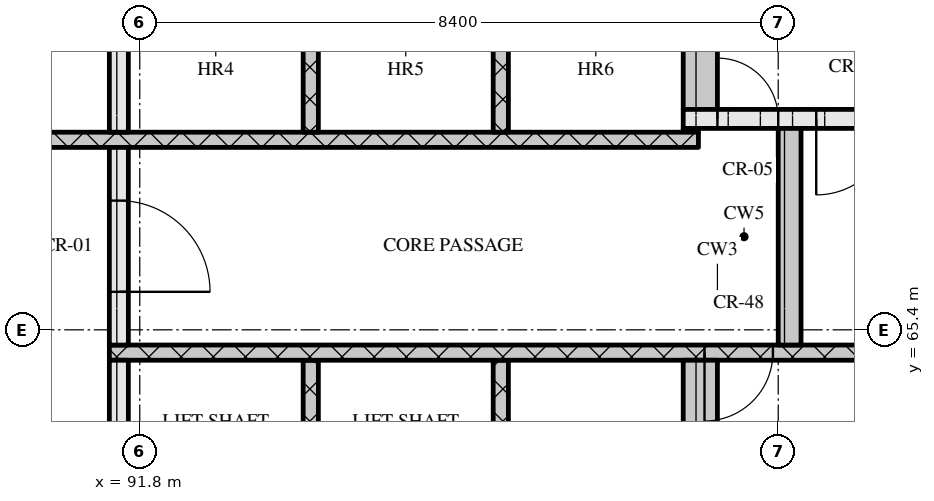
"""IFC4 building model, lengths in metres.
Left out: names, types, materials, properties, quantities, classifications, styles, units other than length and angle.
Written with IfcOpenShell. Run it as: python <this file> out.ifc"""

import sys

from ifc_helpers import new_model, si_unit, direction, frame, frame_2d, origin, place, context, subcontext, project, spatial, rectangle, extrude, element, fill, save


model = new_model("IFC4")
c1 = context("Model", 3, precision=1e-05, world=origin(), true_north=direction((0.0, 1.0)))
c2 = subcontext(c1, "Body", "Model", "MODEL_VIEW")
j1 = project(units=[si_unit("LENGTHUNIT", "METRE"), si_unit("PLANEANGLEUNIT", "RADIAN")], contexts=[c1])
p1 = place(None, origin())
s1 = spatial("IfcSite", under=j1, at=p1, CompositionType="ELEMENT")
p2 = place(p1, origin())
s2 = spatial("IfcBuilding", under=s1, at=p2, CompositionType="ELEMENT")
p3 = place(p2, frame((0.0, 0.0, 95.25)))
s3 = spatial("IfcBuildingStorey", under=s2, at=p3, CompositionType="ELEMENT", Elevation=95.25)
p4 = place(p3, frame((91.525, 62.4, 0.0), z_axis=(0.0, 0.0, 1.0), x_axis=(0.0, 1.0, 0.0)))
e1 = element("IfcWall", 1, at=p4, inside=s3, PredefinedType="SOLIDWALL", context=c2, shape_type="SweptSolid", body=[
    extrude(rectangle(XDim=2.6, YDim=0.25, at=frame_2d((1.3, 0.0))), origin(), (0.0, 0.0, 1.0), 3.32),
])
for number, where, z_axis, x_axis in (
    (2, (94.05, 62.4, 0.0), (0.0, 0.0, 1.0), (0.0, 1.0, 0.0)),
    (3, (96.55, 62.4, 0.0), (0.0, 0.0, 1.0), (0.0, 1.0, 0.0)),
):
    element("IfcWall", number, at=place(p3, frame(where, z_axis=z_axis, x_axis=x_axis)), inside=s3, PredefinedType="SOLIDWALL", context=c2, shape_type="SweptSolid", body=[
        extrude(rectangle(XDim=2.6, YDim=0.2, at=frame_2d((1.3, 0.0))), origin(), (0.0, 0.0, 1.0), 3.32),
    ])
p5 = place(p3, frame((99.175, 62.4, 0.0), z_axis=(0.0, 0.0, 1.0), x_axis=(0.0, 1.0, 0.0)))
e4 = element("IfcWall", 4, at=p5, inside=s3, PredefinedType="SOLIDWALL", context=c2, shape_type="SweptSolid", body=[
    extrude(rectangle(XDim=2.6, YDim=0.45, at=frame_2d((1.3, 0.0))), origin(), (0.0, 0.0, 1.0), 3.32),
])
p6 = place(p3, frame((91.4, 65.1, 0.0), z_axis=(0.0, 0.0, 1.0), x_axis=(1.0, 0.0, 0.0)))
e5 = element("IfcWall", 5, at=p6, inside=s3, PredefinedType="SOLIDWALL", context=c2, shape_type="SweptSolid", body=[
    extrude(rectangle(XDim=16.0, YDim=0.2, at=frame_2d((8.0, 0.0))), origin(), (0.0, 0.0, 1.0), 3.32),
])
p7 = place(p6, frame((7.83, 0.0, 0.0)))
e6 = element("IfcOpeningElement", 6, at=p7, cuts=e5, PredefinedType="OPENING", context=c2, shape_type="SweptSolid", body=[
    extrude(rectangle(XDim=0.9, YDim=2.1, at=frame_2d((0.45, 1.05))), frame((0.0, 0.11, 0.0), z_axis=(0.0, -1.0, 0.0), x_axis=(1.0, 0.0, 0.0)), (0.0, 0.0, 1.0), 0.22),
])
p8 = place(p3, frame((91.525, 65.2, 0.0), z_axis=(0.0, 0.0, 1.0), x_axis=(0.0, 1.0, 0.0)))
e7 = element("IfcWall", 7, at=p8, inside=s3, PredefinedType="SOLIDWALL", context=c2, shape_type="SweptSolid", body=[
    extrude(rectangle(XDim=2.6, YDim=0.25, at=frame_2d((1.3, 0.0))), origin(), (0.0, 0.0, 1.0), 3.32),
])
p9 = place(p8, frame((0.7, 0.0, 0.0)))
e8 = element("IfcOpeningElement", 8, at=p9, cuts=e7, PredefinedType="OPENING", context=c2, shape_type="SweptSolid", body=[
    extrude(rectangle(XDim=1.2, YDim=2.1, at=frame_2d((0.6, 1.05))), frame((0.0, 0.135, 0.0), z_axis=(0.0, -1.0, 0.0), x_axis=(1.0, 0.0, 0.0)), (0.0, 0.0, 1.0), 0.27),
])
p10 = place(p3, frame((100.35, 65.2, 0.0), z_axis=(0.0, 0.0, 1.0), x_axis=(0.0, 1.0, 0.0)))
e9 = element("IfcWall", 9, at=p10, inside=s3, PredefinedType="SOLIDWALL", context=c2, shape_type="SweptSolid", body=[
    extrude(rectangle(XDim=2.85, YDim=0.3, at=frame_2d((1.425, 0.0))), origin(), (0.0, 0.0, 1.0), 3.32),
])
p11 = place(p3, frame((76.05, 67.9, 0.0), z_axis=(0.0, 0.0, 1.0), x_axis=(1.0, 0.0, 0.0)))
e10 = element("IfcWall", 10, at=p11, inside=s3, PredefinedType="SOLIDWALL", context=c2, shape_type="SweptSolid", body=[
    extrude(rectangle(XDim=23.1, YDim=0.2, at=frame_2d((11.55, 0.0))), origin(), (0.0, 0.0, 1.0), 3.32),
])
p12 = place(p11, frame((0.6, 0.0, 0.0)))
e11 = element("IfcOpeningElement", 11, at=p12, cuts=e10, PredefinedType="OPENING", context=c2, shape_type="SweptSolid", body=[
    extrude(rectangle(XDim=1.1, YDim=2.1, at=frame_2d((0.55, 1.05))), frame((0.0, 0.11, 0.0), z_axis=(0.0, -1.0, 0.0), x_axis=(1.0, 0.0, 0.0)), (0.0, 0.0, 1.0), 0.22),
])
p13 = place(p11, frame((3.1, 0.0, 0.0)))
e12 = element("IfcOpeningElement", 12, at=p13, cuts=e10, PredefinedType="OPENING", context=c2, shape_type="SweptSolid", body=[
    extrude(rectangle(XDim=1.1, YDim=2.1, at=frame_2d((0.55, 1.05))), frame((0.0, 0.11, 0.0), z_axis=(0.0, -1.0, 0.0), x_axis=(1.0, 0.0, 0.0)), (0.0, 0.0, 1.0), 0.22),
])
p14 = place(p11, frame((5.6, 0.0, 0.0)))
e13 = element("IfcOpeningElement", 13, at=p14, cuts=e10, PredefinedType="OPENING", context=c2, shape_type="SweptSolid", body=[
    extrude(rectangle(XDim=1.1, YDim=2.1, at=frame_2d((0.55, 1.05))), frame((0.0, 0.11, 0.0), z_axis=(0.0, -1.0, 0.0), x_axis=(1.0, 0.0, 0.0)), (0.0, 0.0, 1.0), 0.22),
])
p15 = place(p11, frame((8.45, 0.0, 0.0)))
e14 = element("IfcOpeningElement", 14, at=p15, cuts=e10, PredefinedType="OPENING", context=c2, shape_type="SweptSolid", body=[
    extrude(rectangle(XDim=0.9, YDim=2.1, at=frame_2d((0.45, 1.05))), frame((0.0, 0.11, 0.0), z_axis=(0.0, -1.0, 0.0), x_axis=(1.0, 0.0, 0.0)), (0.0, 0.0, 1.0), 0.22),
])
p16 = place(p11, frame((10.91, 0.0, 0.0)))
e15 = element("IfcOpeningElement", 15, at=p16, cuts=e10, PredefinedType="OPENING", context=c2, shape_type="SweptSolid", body=[
    extrude(rectangle(XDim=0.9, YDim=2.1, at=frame_2d((0.45, 1.05))), frame((0.0, 0.11, 0.0), z_axis=(0.0, -1.0, 0.0), x_axis=(1.0, 0.0, 0.0)), (0.0, 0.0, 1.0), 0.22),
])
p17 = place(p11, frame((13.55, 0.0, 0.0)))
e16 = element("IfcOpeningElement", 16, at=p17, cuts=e10, PredefinedType="OPENING", context=c2, shape_type="SweptSolid", body=[
    extrude(rectangle(XDim=1.0, YDim=2.1, at=frame_2d((0.5, 1.05))), frame((0.0, 0.11, 0.0), z_axis=(0.0, -1.0, 0.0), x_axis=(1.0, 0.0, 0.0)), (0.0, 0.0, 1.0), 0.22),
])
p18 = place(p3, frame((91.525, 68.0, 0.0), z_axis=(0.0, 0.0, 1.0), x_axis=(0.0, 1.0, 0.0)))
e17 = element("IfcWall", 17, at=p18, inside=s3, PredefinedType="SOLIDWALL", context=c2, shape_type="SweptSolid", body=[
    extrude(rectangle(XDim=2.6, YDim=0.25, at=frame_2d((1.3, 0.0))), origin(), (0.0, 0.0, 1.0), 3.32),
])
for number, where, z_axis, x_axis in (
    (18, (94.05, 68.0, 0.0), (0.0, 0.0, 1.0), (0.0, 1.0, 0.0)),
    (19, (96.55, 68.0, 0.0), (0.0, 0.0, 1.0), (0.0, 1.0, 0.0)),
):
    element("IfcWall", number, at=place(p3, frame(where, z_axis=z_axis, x_axis=x_axis)), inside=s3, PredefinedType="SOLIDWALL", context=c2, shape_type="SweptSolid", body=[
        extrude(rectangle(XDim=2.6, YDim=0.2, at=frame_2d((1.3, 0.0))), origin(), (0.0, 0.0, 1.0), 3.32),
    ])
p19 = place(p3, frame((98.95, 68.025, 0.0), z_axis=(0.0, 0.0, 1.0), x_axis=(1.0, 0.0, 0.0)))
e20 = element("IfcWall", 20, at=p19, inside=s3, PredefinedType="SOLIDWALL", context=c2, shape_type="SweptSolid", body=[
    extrude(rectangle(XDim=0.2, YDim=0.05, at=frame_2d((0.1, 0.0))), origin(), (0.0, 0.0, 1.0), 3.32),
])
p20 = place(p3, frame((98.95, 68.175, 0.0), z_axis=(0.0, 0.0, 1.0), x_axis=(1.0, 0.0, 0.0)))
e21 = element("IfcWall", 21, at=p20, inside=s3, PredefinedType="SOLIDWALL", context=c2, shape_type="SweptSolid", body=[
    extrude(rectangle(XDim=8.45, YDim=0.25, at=frame_2d((4.225, 0.0))), origin(), (0.0, 0.0, 1.0), 3.32),
])
p21 = place(p20, frame((0.45, 0.0, 0.0)))
e22 = element("IfcOpeningElement", 22, at=p21, cuts=e21, PredefinedType="OPENING", context=c2, shape_type="SweptSolid", body=[
    extrude(rectangle(XDim=0.8, YDim=2.1, at=frame_2d((0.4, 1.05))), frame((0.0, 0.135, 0.0), z_axis=(0.0, -1.0, 0.0), x_axis=(1.0, 0.0, 0.0)), (0.0, 0.0, 1.0), 0.27),
])
p22 = place(p20, frame((1.75, 0.0, 0.0)))
e23 = element("IfcOpeningElement", 23, at=p22, cuts=e21, PredefinedType="OPENING", context=c2, shape_type="SweptSolid", body=[
    extrude(rectangle(XDim=1.0, YDim=2.1, at=frame_2d((0.5, 1.05))), frame((0.0, 0.135, 0.0), z_axis=(0.0, -1.0, 0.0), x_axis=(1.0, 0.0, 0.0)), (0.0, 0.0, 1.0), 0.27),
])
p23 = place(p3, frame((99.175, 68.3, 0.0), z_axis=(0.0, 0.0, 1.0), x_axis=(0.0, 1.0, 0.0)))
e24 = element("IfcWall", 24, at=p23, inside=s3, PredefinedType="SOLIDWALL", context=c2, shape_type="SweptSolid", body=[
    extrude(rectangle(XDim=2.3, YDim=0.45, at=frame_2d((1.15, 0.0))), origin(), (0.0, 0.0, 1.0), 3.32),
])
p24 = place(p7, origin())
e25 = element("IfcDoor", 25, at=p24, inside=s3, OperationType="SINGLE_SWING_RIGHT", PredefinedType="DOOR", context=c2, shape_type="SweptSolid", body=[
    extrude(rectangle(XDim=0.9, YDim=2.1, at=frame_2d((0.45, 1.05))), frame((0.0, 0.025, 0.0), z_axis=(0.0, -1.0, 0.0), x_axis=(1.0, 0.0, 0.0)), (0.0, 0.0, 1.0), 0.05),
])
fill(e6, e25)
p25 = place(p9, origin())
e26 = element("IfcDoor", 26, at=p25, inside=s3, OperationType="SINGLE_SWING_RIGHT", PredefinedType="DOOR", context=c2, shape_type="SweptSolid", body=[
    extrude(rectangle(XDim=1.2, YDim=2.1, at=frame_2d((0.6, 1.05))), frame((0.0, 0.025, 0.0), z_axis=(0.0, -1.0, 0.0), x_axis=(1.0, 0.0, 0.0)), (0.0, 0.0, 1.0), 0.05),
])
fill(e8, e26)
p26 = place(p21, origin())
e27 = element("IfcDoor", 27, at=p26, inside=s3, OperationType="SINGLE_SWING_LEFT", PredefinedType="DOOR", context=c2, shape_type="SweptSolid", body=[
    extrude(rectangle(XDim=0.8, YDim=2.1, at=frame_2d((0.4, 1.05))), frame((0.0, 0.025, 0.0), z_axis=(0.0, -1.0, 0.0), x_axis=(1.0, 0.0, 0.0)), (0.0, 0.0, 1.0), 0.05),
])
fill(e22, e27)
p27 = place(p22, origin())
e28 = element("IfcDoor", 28, at=p27, inside=s3, OperationType="SINGLE_SWING_RIGHT", PredefinedType="DOOR", context=c2, shape_type="SweptSolid", body=[
    extrude(rectangle(XDim=1.0, YDim=2.1, at=frame_2d((0.5, 1.05))), frame((0.0, 0.025, 0.0), z_axis=(0.0, -1.0, 0.0), x_axis=(1.0, 0.0, 0.0)), (0.0, 0.0, 1.0), 0.05),
])
fill(e23, e28)
save(model, sys.argv[1])
